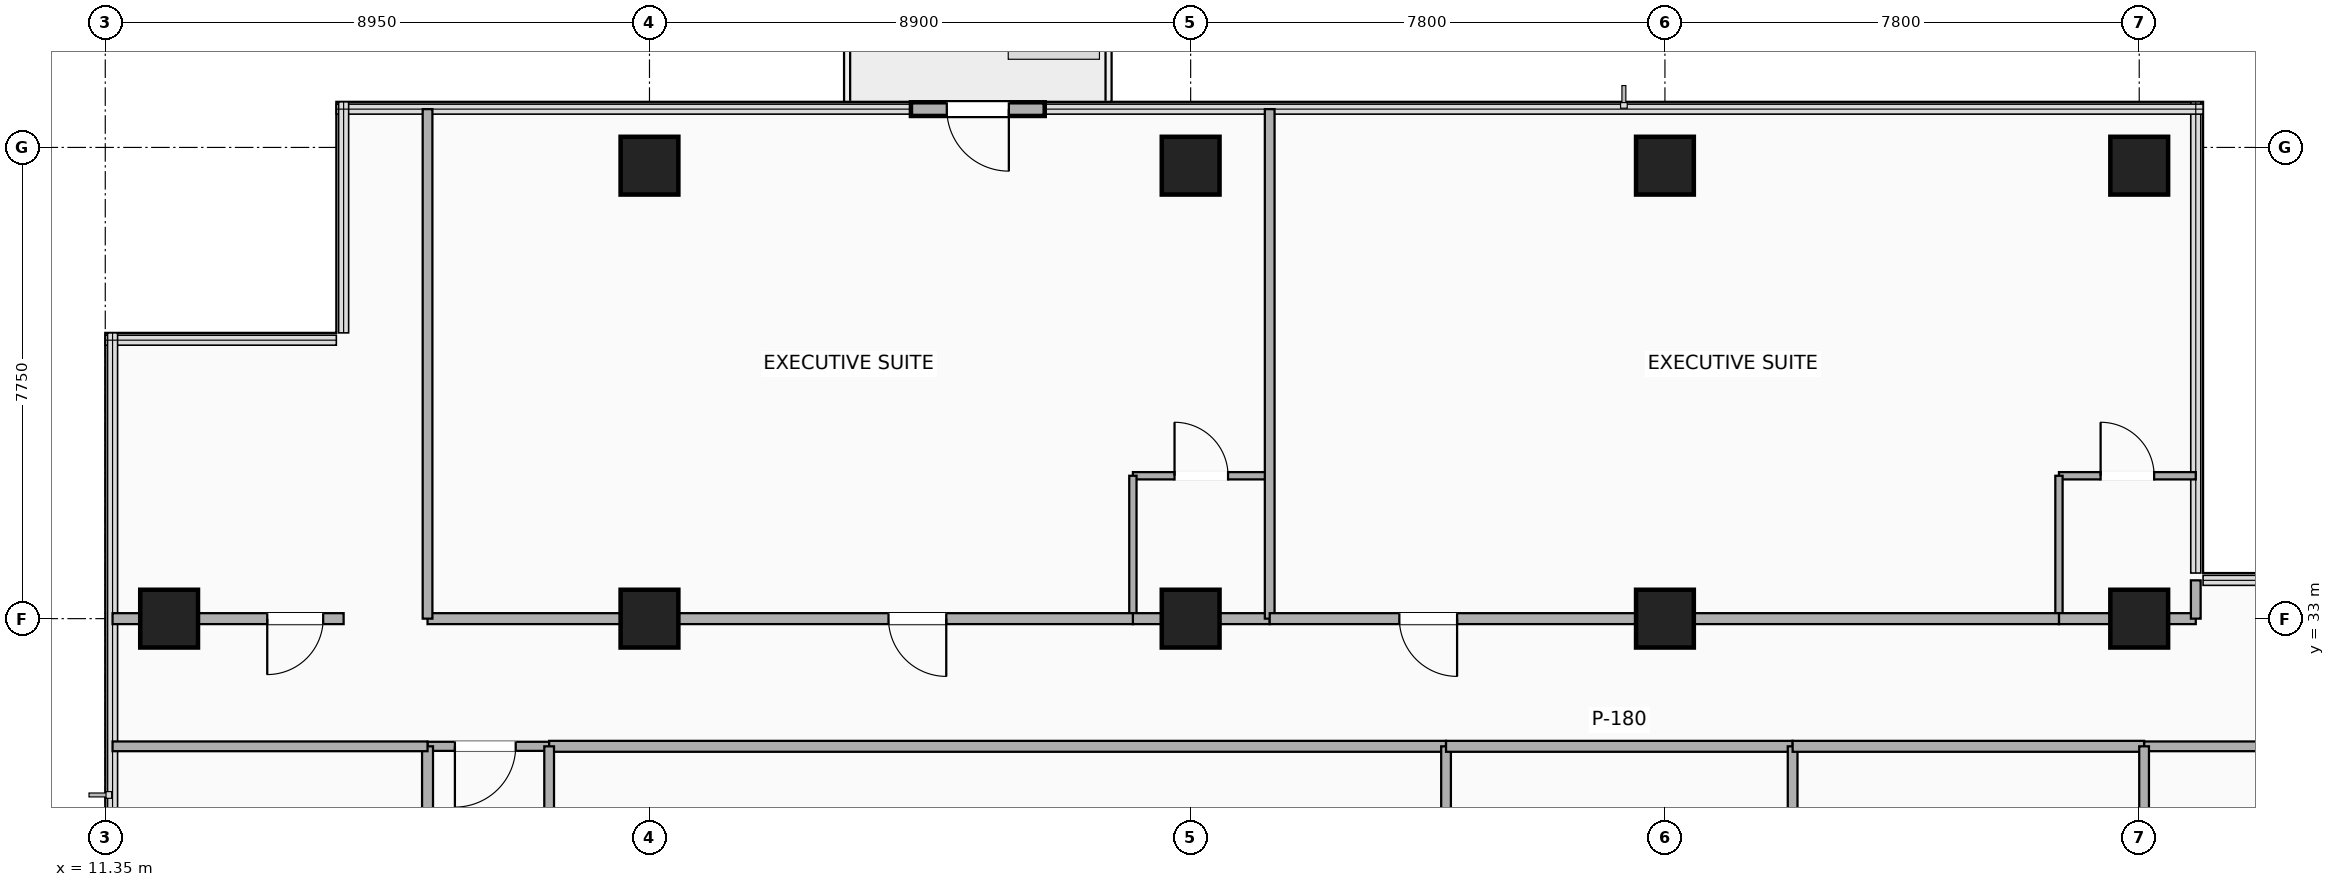
"""IFC4 building model, lengths in metres.
Left out: names, types, materials, properties, quantities, classifications, styles, units other than length and angle.
Written with IfcOpenShell. Run it as: python <this file> out.ifc"""

import sys

from ifc_helpers import new_model, si_unit, direction, frame, frame_2d, origin, origin_2d, place, context, subcontext, project, spatial, rectangle, extrude, element, fill, save


model = new_model("IFC4")
c1 = context("Model", 3, precision=1e-05, world=origin(), true_north=direction((0.0, 1.0)))
c2 = subcontext(c1, "Body", "Model", "MODEL_VIEW")
j1 = project(units=[si_unit("LENGTHUNIT", "METRE"), si_unit("PLANEANGLEUNIT", "RADIAN")], contexts=[c1])
p1 = place(None, origin())
s1 = spatial("IfcSite", under=j1, at=p1, CompositionType="ELEMENT")
p2 = place(p1, origin())
s2 = spatial("IfcBuilding", under=s1, at=p2, CompositionType="ELEMENT")
p3 = place(p2, frame((0.0, 0.0, 224.9)))
s3 = spatial("IfcBuildingStorey", under=s2, at=p3, CompositionType="ELEMENT", Elevation=224.9)
for number, where, z_axis, x_axis in (
    (1, (20.3, 33.0, -0.24), (0.0, 0.0, 1.0), (1.0, 0.0, 0.0)),
    (2, (29.2, 33.0, -0.24), (0.0, 0.0, 1.0), (1.0, 0.0, 0.0)),
    (3, (37.0, 33.0, -0.24), (0.0, 0.0, 1.0), (1.0, 0.0, 0.0)),
    (4, (44.8, 33.0, -0.24), (0.0, 0.0, 1.0), (1.0, 0.0, 0.0)),
    (5, (12.4, 33.0, -0.24), (0.0, 0.0, 1.0), (1.0, 0.0, 0.0)),
    (6, (20.3, 40.45, -0.24), (0.0, 0.0, 1.0), (1.0, 0.0, 0.0)),
    (7, (29.2, 40.45, -0.24), (0.0, 0.0, 1.0), (1.0, 0.0, 0.0)),
    (8, (37.0, 40.45, -0.24), (0.0, 0.0, 1.0), (1.0, 0.0, 0.0)),
    (9, (44.8, 40.45, -0.24), (0.0, 0.0, 1.0), (1.0, 0.0, 0.0)),
):
    element("IfcColumn", number, at=place(p3, frame(where, z_axis=z_axis, x_axis=x_axis)), inside=s3, PredefinedType="COLUMN", context=c2, shape_type="SweptSolid", body=[
        extrude(rectangle(XDim=0.95, YDim=0.95, at=origin_2d()), origin(), (0.0, 0.0, 1.0), 3.5),
    ])
p4 = place(p3, frame((24.6, 41.38, 0.0), z_axis=(0.0, 0.0, 1.0), x_axis=(1.0, 0.0, 0.0)))
e10 = element("IfcWall", 10, at=p4, inside=s3, PredefinedType="SOLIDWALL", context=c2, shape_type="SweptSolid", body=[
    extrude(rectangle(XDim=2.2, YDim=0.225, at=frame_2d((1.1, 0.0))), origin(), (0.0, 0.0, 1.0), 3.26),
])
p5 = place(p4, frame((0.59, 0.0, 0.0)))
e11 = element("IfcOpeningElement", 11, at=p5, cuts=e10, PredefinedType="OPENING", context=c2, shape_type="SweptSolid", body=[
    extrude(rectangle(XDim=1.02, YDim=2.1, at=frame_2d((0.51, 1.05))), frame((0.0, 0.123, 0.0), z_axis=(0.0, -1.0, 0.0), x_axis=(1.0, 0.0, 0.0)), (0.0, 0.0, 1.0), 0.245),
])
p6 = place(p3, frame((16.65, 30.9, 0.0), z_axis=(0.0, 0.0, 1.0), x_axis=(1.0, 0.0, 0.0)))
e12 = element("IfcWall", 12, at=p6, inside=s3, PredefinedType="PARTITIONING", context=c2, shape_type="SweptSolid", body=[
    extrude(rectangle(XDim=2.0, YDim=0.15, at=frame_2d((1.0, 0.0))), origin(), (0.0, 0.0, 1.0), 3.26),
])
p7 = place(p6, frame((0.45, 0.0, 0.0)))
e13 = element("IfcOpeningElement", 13, at=p7, cuts=e12, PredefinedType="OPENING", context=c2, shape_type="SweptSolid", body=[
    extrude(rectangle(XDim=1.0, YDim=2.15, at=frame_2d((0.5, 1.075))), frame((0.0, 0.085, 0.0), z_axis=(0.0, -1.0, 0.0), x_axis=(1.0, 0.0, 0.0)), (0.0, 0.0, 1.0), 0.17),
])
p8 = place(p3, frame((44.88, 30.9, 0.0), z_axis=(0.0, 0.0, 1.0), x_axis=(1.0, 0.0, 0.0)))
e14 = element("IfcWall", 14, at=p8, inside=s3, PredefinedType="PARTITIONING", context=c2, shape_type="SweptSolid", body=[
    extrude(rectangle(XDim=8.6, YDim=0.16, at=frame_2d((4.3, 0.0))), origin(), (0.0, 0.0, 1.0), 2.472),
])
p9 = place(p3, frame((18.65, 30.9, 0.0), z_axis=(0.0, 0.0, 1.0), x_axis=(1.0, 0.0, 0.0)))
e15 = element("IfcWall", 15, at=p9, inside=s3, PredefinedType="PARTITIONING", context=c2, shape_type="SweptSolid", body=[
    extrude(rectangle(XDim=14.75, YDim=0.18, at=frame_2d((7.375, 0.0))), origin(), (0.0, 0.0, 1.0), 2.472),
])
for number, where, z_axis, x_axis in (
    (16, (18.65, 22.65, 0.0), (0.0, 0.0, 1.0), (0.0, 1.0, 0.0)),
    (17, (33.4, 22.65, 0.0), (0.0, 0.0, 1.0), (0.0, 1.0, 0.0)),
):
    element("IfcWall", number, at=place(p3, frame(where, z_axis=z_axis, x_axis=x_axis)), inside=s3, PredefinedType="PARTITIONING", context=c2, shape_type="SweptSolid", body=[
        extrude(rectangle(XDim=8.25, YDim=0.16, at=frame_2d((4.125, 0.0))), origin(), (0.0, 0.0, 1.0), 2.887),
    ])
p10 = place(p3, frame((33.4, 30.9, 0.0), z_axis=(0.0, 0.0, 1.0), x_axis=(1.0, 0.0, 0.0)))
e18 = element("IfcWall", 18, at=p10, inside=s3, PredefinedType="PARTITIONING", context=c2, shape_type="SweptSolid", body=[
    extrude(rectangle(XDim=5.7, YDim=0.18, at=frame_2d((2.85, 0.0))), origin(), (0.0, 0.0, 1.0), 2.472),
])
p11 = place(p3, frame((39.1, 22.65, 0.0), z_axis=(0.0, 0.0, 1.0), x_axis=(0.0, 1.0, 0.0)))
e19 = element("IfcWall", 19, at=p11, inside=s3, PredefinedType="PARTITIONING", context=c2, shape_type="SweptSolid", body=[
    extrude(rectangle(XDim=8.25, YDim=0.16, at=frame_2d((4.125, 0.0))), origin(), (0.0, 0.0, 1.0), 2.887),
])
p12 = place(p3, frame((39.1, 30.9, 0.0), z_axis=(0.0, 0.0, 1.0), x_axis=(1.0, 0.0, 0.0)))
e20 = element("IfcWall", 20, at=p12, inside=s3, PredefinedType="PARTITIONING", context=c2, shape_type="SweptSolid", body=[
    extrude(rectangle(XDim=5.78, YDim=0.18, at=frame_2d((2.89, 0.0))), origin(), (0.0, 0.0, 1.0), 2.472),
])
p13 = place(p3, frame((44.88, 22.65, 0.0), z_axis=(0.0, 0.0, 1.0), x_axis=(0.0, 1.0, 0.0)))
e21 = element("IfcWall", 21, at=p13, inside=s3, PredefinedType="PARTITIONING", context=c2, shape_type="SweptSolid", body=[
    extrude(rectangle(XDim=8.25, YDim=0.16, at=frame_2d((4.125, 0.0))), origin(), (0.0, 0.0, 1.0), 2.472),
])
p14 = place(p3, frame((28.25, 35.35, 0.0), z_axis=(0.0, 0.0, 1.0), x_axis=(1.0, 0.0, 0.0)))
e22 = element("IfcWall", 22, at=p14, inside=s3, PredefinedType="PARTITIONING", context=c2, shape_type="SweptSolid", body=[
    extrude(rectangle(XDim=2.25, YDim=0.12, at=frame_2d((1.125, 0.0))), origin(), (0.0, 0.0, 1.0), 2.472),
])
p15 = place(p14, frame((1.565, 0.0, 0.0), z_axis=(0.0, 0.0, 1.0), x_axis=(-1.0, 0.0, 0.0)))
e23 = element("IfcOpeningElement", 23, at=p15, cuts=e22, PredefinedType="OPENING", context=c2, shape_type="SweptSolid", body=[
    extrude(rectangle(XDim=0.88, YDim=2.08, at=frame_2d((0.44, 1.04))), frame((0.0, 0.07, 0.0), z_axis=(0.0, -1.0, 0.0), x_axis=(1.0, 0.0, 0.0)), (0.0, 0.0, 1.0), 0.14),
])
p16 = place(p3, frame((28.25, 33.0, 0.0), z_axis=(0.0, 0.0, 1.0), x_axis=(0.0, 1.0, 0.0)))
e24 = element("IfcWall", 24, at=p16, inside=s3, PredefinedType="PARTITIONING", context=c2, shape_type="SweptSolid", body=[
    extrude(rectangle(XDim=2.35, YDim=0.12, at=frame_2d((1.175, 0.0))), origin(), (0.0, 0.0, 1.0), 2.706),
])
p17 = place(p3, frame((28.25, 33.0, 0.0), z_axis=(0.0, 0.0, 1.0), x_axis=(1.0, 0.0, 0.0)))
e25 = element("IfcWall", 25, at=p17, inside=s3, PredefinedType="PARTITIONING", context=c2, shape_type="SweptSolid", body=[
    extrude(rectangle(XDim=2.25, YDim=0.18, at=frame_2d((1.125, 0.0))), origin(), (0.0, 0.0, 1.0), 2.472),
])
p18 = place(p3, frame((16.65, 33.0, 0.0), z_axis=(0.0, 0.0, 1.0), x_axis=(1.0, 0.0, 0.0)))
e26 = element("IfcWall", 26, at=p18, inside=s3, PredefinedType="PARTITIONING", context=c2, shape_type="SweptSolid", body=[
    extrude(rectangle(XDim=11.6, YDim=0.18, at=frame_2d((5.8, 0.0))), origin(), (0.0, 0.0, 1.0), 2.472),
])
p19 = place(p18, frame((7.581, 0.0, 0.0)))
e27 = element("IfcOpeningElement", 27, at=p19, cuts=e26, PredefinedType="OPENING", context=c2, shape_type="SweptSolid", body=[
    extrude(rectangle(XDim=0.95, YDim=2.15, at=frame_2d((0.475, 1.075))), frame((0.0, 0.1, 0.0), z_axis=(0.0, -1.0, 0.0), x_axis=(1.0, 0.0, 0.0)), (0.0, 0.0, 1.0), 0.2),
])
p20 = place(p3, frame((16.65, 33.0, 0.0), z_axis=(0.0, 0.0, 1.0), x_axis=(0.0, 1.0, 0.0)))
e28 = element("IfcWall", 28, at=p20, inside=s3, PredefinedType="PARTITIONING", context=c2, shape_type="SweptSolid", body=[
    extrude(rectangle(XDim=8.38, YDim=0.16, at=frame_2d((4.19, 0.0))), origin(), (0.0, 0.0, 1.0), 2.472),
])
p21 = place(p3, frame((30.5, 33.0, 0.0), z_axis=(0.0, 0.0, 1.0), x_axis=(0.0, 1.0, 0.0)))
e29 = element("IfcWall", 29, at=p21, inside=s3, PredefinedType="PARTITIONING", context=c2, shape_type="SweptSolid", body=[
    extrude(rectangle(XDim=8.38, YDim=0.16, at=frame_2d((4.19, 0.0))), origin(), (0.0, 0.0, 1.0), 2.706),
])
p22 = place(p3, frame((43.48, 35.35, 0.0), z_axis=(0.0, 0.0, 1.0), x_axis=(1.0, 0.0, 0.0)))
e30 = element("IfcWall", 30, at=p22, inside=s3, PredefinedType="PARTITIONING", context=c2, shape_type="SweptSolid", body=[
    extrude(rectangle(XDim=2.25, YDim=0.12, at=frame_2d((1.125, 0.0))), origin(), (0.0, 0.0, 1.0), 2.472),
])
p23 = place(p22, frame((1.565, 0.0, 0.0), z_axis=(0.0, 0.0, 1.0), x_axis=(-1.0, 0.0, 0.0)))
e31 = element("IfcOpeningElement", 31, at=p23, cuts=e30, PredefinedType="OPENING", context=c2, shape_type="SweptSolid", body=[
    extrude(rectangle(XDim=0.88, YDim=2.08, at=frame_2d((0.44, 1.04))), frame((0.0, 0.07, 0.0), z_axis=(0.0, -1.0, 0.0), x_axis=(1.0, 0.0, 0.0)), (0.0, 0.0, 1.0), 0.14),
])
p24 = place(p3, frame((43.48, 33.0, 0.0), z_axis=(0.0, 0.0, 1.0), x_axis=(0.0, 1.0, 0.0)))
e32 = element("IfcWall", 32, at=p24, inside=s3, PredefinedType="PARTITIONING", context=c2, shape_type="SweptSolid", body=[
    extrude(rectangle(XDim=2.35, YDim=0.12, at=frame_2d((1.175, 0.0))), origin(), (0.0, 0.0, 1.0), 2.706),
])
p25 = place(p3, frame((43.48, 33.0, 0.0), z_axis=(0.0, 0.0, 1.0), x_axis=(1.0, 0.0, 0.0)))
e33 = element("IfcWall", 33, at=p25, inside=s3, PredefinedType="PARTITIONING", context=c2, shape_type="SweptSolid", body=[
    extrude(rectangle(XDim=2.25, YDim=0.18, at=frame_2d((1.125, 0.0))), origin(), (0.0, 0.0, 1.0), 2.472),
])
p26 = place(p3, frame((30.5, 33.0, 0.0), z_axis=(0.0, 0.0, 1.0), x_axis=(1.0, 0.0, 0.0)))
e34 = element("IfcWall", 34, at=p26, inside=s3, PredefinedType="PARTITIONING", context=c2, shape_type="SweptSolid", body=[
    extrude(rectangle(XDim=12.98, YDim=0.18, at=frame_2d((6.49, 0.0))), origin(), (0.0, 0.0, 1.0), 2.472),
])
p27 = place(p26, frame((2.132, 0.0, 0.0)))
e35 = element("IfcOpeningElement", 35, at=p27, cuts=e34, PredefinedType="OPENING", context=c2, shape_type="SweptSolid", body=[
    extrude(rectangle(XDim=0.95, YDim=2.15, at=frame_2d((0.475, 1.075))), frame((0.0, 0.1, 0.0), z_axis=(0.0, -1.0, 0.0), x_axis=(1.0, 0.0, 0.0)), (0.0, 0.0, 1.0), 0.2),
])
p28 = place(p3, frame((45.73, 33.0, 0.0), z_axis=(0.0, 0.0, 1.0), x_axis=(0.0, 1.0, 0.0)))
e36 = element("IfcWall", 36, at=p28, inside=s3, PredefinedType="PARTITIONING", context=c2, shape_type="SweptSolid", body=[
    extrude(rectangle(XDim=0.63, YDim=0.16, at=frame_2d((0.315, 0.0))), origin(), (0.0, 0.0, 1.0), 2.472),
])
p29 = place(p3, frame((16.65, 17.8, 0.0), z_axis=(0.0, 0.0, 1.0), x_axis=(0.0, 1.0, 0.0)))
e37 = element("IfcWall", 37, at=p29, inside=s3, PredefinedType="PARTITIONING", context=c2, shape_type="SweptSolid", body=[
    extrude(rectangle(XDim=13.1, YDim=0.18, at=frame_2d((6.55, 0.0))), origin(), (0.0, 0.0, 1.0), 2.472),
])
p30 = place(p29, frame((6.075, 0.0, 0.0)))
e38 = element("IfcOpeningElement", 38, at=p30, cuts=e37, PredefinedType="OPENING", context=c2, shape_type="SweptSolid", body=[
    extrude(rectangle(XDim=0.95, YDim=2.15, at=frame_2d((0.475, 1.075))), frame((0.0, 0.1, 0.0), z_axis=(0.0, -1.0, 0.0), x_axis=(1.0, 0.0, 0.0)), (0.0, 0.0, 1.0), 0.2),
])
p31 = place(p3, frame((11.47, 30.9, 0.0), z_axis=(0.0, 0.0, 1.0), x_axis=(1.0, 0.0, 0.0)))
e39 = element("IfcWall", 39, at=p31, inside=s3, PredefinedType="PARTITIONING", context=c2, shape_type="SweptSolid", body=[
    extrude(rectangle(XDim=5.18, YDim=0.16, at=frame_2d((2.59, 0.0))), origin(), (0.0, 0.0, 1.0), 2.782),
])
p32 = place(p3, frame((11.47, 33.0, 0.0), z_axis=(0.0, 0.0, 1.0), x_axis=(1.0, 0.0, 0.0)))
e40 = element("IfcWall", 40, at=p32, inside=s3, PredefinedType="PARTITIONING", context=c2, shape_type="SweptSolid", body=[
    extrude(rectangle(XDim=3.8, YDim=0.18, at=frame_2d((1.9, 0.0))), origin(), (0.0, 0.0, 1.0), 2.472),
])
p33 = place(p32, frame((2.544, 0.0, 0.0)))
e41 = element("IfcOpeningElement", 41, at=p33, cuts=e40, PredefinedType="OPENING", context=c2, shape_type="SweptSolid", body=[
    extrude(rectangle(XDim=0.92, YDim=2.08, at=frame_2d((0.46, 1.04))), frame((0.0, 0.1, 0.0), z_axis=(0.0, -1.0, 0.0), x_axis=(1.0, 0.0, 0.0)), (0.0, 0.0, 1.0), 0.2),
])
p34 = place(p5, origin())
e42 = element("IfcDoor", 42, at=p34, inside=s3, OperationType="SINGLE_SWING_RIGHT", PredefinedType="DOOR", context=c2, shape_type="SweptSolid", body=[
    extrude(rectangle(XDim=1.02, YDim=2.1, at=frame_2d((0.51, 1.05))), frame((0.0, 0.025, 0.0), z_axis=(0.0, -1.0, 0.0), x_axis=(1.0, 0.0, 0.0)), (0.0, 0.0, 1.0), 0.05),
])
fill(e11, e42)
p35 = place(p7, origin())
e43 = element("IfcDoor", 43, at=p35, inside=s3, OperationType="SINGLE_SWING_LEFT", PredefinedType="DOOR", context=c2, shape_type="SweptSolid", body=[
    extrude(rectangle(XDim=1.0, YDim=2.15, at=frame_2d((0.5, 1.075))), frame((0.0, 0.025, 0.0), z_axis=(0.0, -1.0, 0.0), x_axis=(1.0, 0.0, 0.0)), (0.0, 0.0, 1.0), 0.05),
])
fill(e13, e43)
p36 = place(p15, origin())
e44 = element("IfcDoor", 44, at=p36, inside=s3, OperationType="SINGLE_SWING_LEFT", PredefinedType="DOOR", context=c2, shape_type="SweptSolid", body=[
    extrude(rectangle(XDim=0.88, YDim=2.08, at=frame_2d((0.44, 1.04))), frame((0.0, 0.025, 0.0), z_axis=(0.0, -1.0, 0.0), x_axis=(1.0, 0.0, 0.0)), (0.0, 0.0, 1.0), 0.05),
])
fill(e23, e44)
p37 = place(p19, origin())
e45 = element("IfcDoor", 45, at=p37, inside=s3, OperationType="SINGLE_SWING_RIGHT", PredefinedType="DOOR", context=c2, shape_type="SweptSolid", body=[
    extrude(rectangle(XDim=0.95, YDim=2.15, at=frame_2d((0.475, 1.075))), frame((0.0, 0.025, 0.0), z_axis=(0.0, -1.0, 0.0), x_axis=(1.0, 0.0, 0.0)), (0.0, 0.0, 1.0), 0.05),
])
fill(e27, e45)
p38 = place(p23, origin())
e46 = element("IfcDoor", 46, at=p38, inside=s3, OperationType="SINGLE_SWING_LEFT", PredefinedType="DOOR", context=c2, shape_type="SweptSolid", body=[
    extrude(rectangle(XDim=0.88, YDim=2.08, at=frame_2d((0.44, 1.04))), frame((0.0, 0.025, 0.0), z_axis=(0.0, -1.0, 0.0), x_axis=(1.0, 0.0, 0.0)), (0.0, 0.0, 1.0), 0.05),
])
fill(e31, e46)
p39 = place(p27, origin())
e47 = element("IfcDoor", 47, at=p39, inside=s3, OperationType="SINGLE_SWING_RIGHT", PredefinedType="DOOR", context=c2, shape_type="SweptSolid", body=[
    extrude(rectangle(XDim=0.95, YDim=2.15, at=frame_2d((0.475, 1.075))), frame((0.0, 0.025, 0.0), z_axis=(0.0, -1.0, 0.0), x_axis=(1.0, 0.0, 0.0)), (0.0, 0.0, 1.0), 0.05),
])
fill(e35, e47)
p40 = place(p33, origin())
e48 = element("IfcDoor", 48, at=p40, inside=s3, OperationType="SINGLE_SWING_LEFT", PredefinedType="DOOR", context=c2, shape_type="SweptSolid", body=[
    extrude(rectangle(XDim=0.92, YDim=2.08, at=frame_2d((0.46, 1.04))), frame((0.0, 0.025, 0.0), z_axis=(0.0, -1.0, 0.0), x_axis=(1.0, 0.0, 0.0)), (0.0, 0.0, 1.0), 0.05),
])
fill(e41, e48)
save(model, sys.argv[1])
